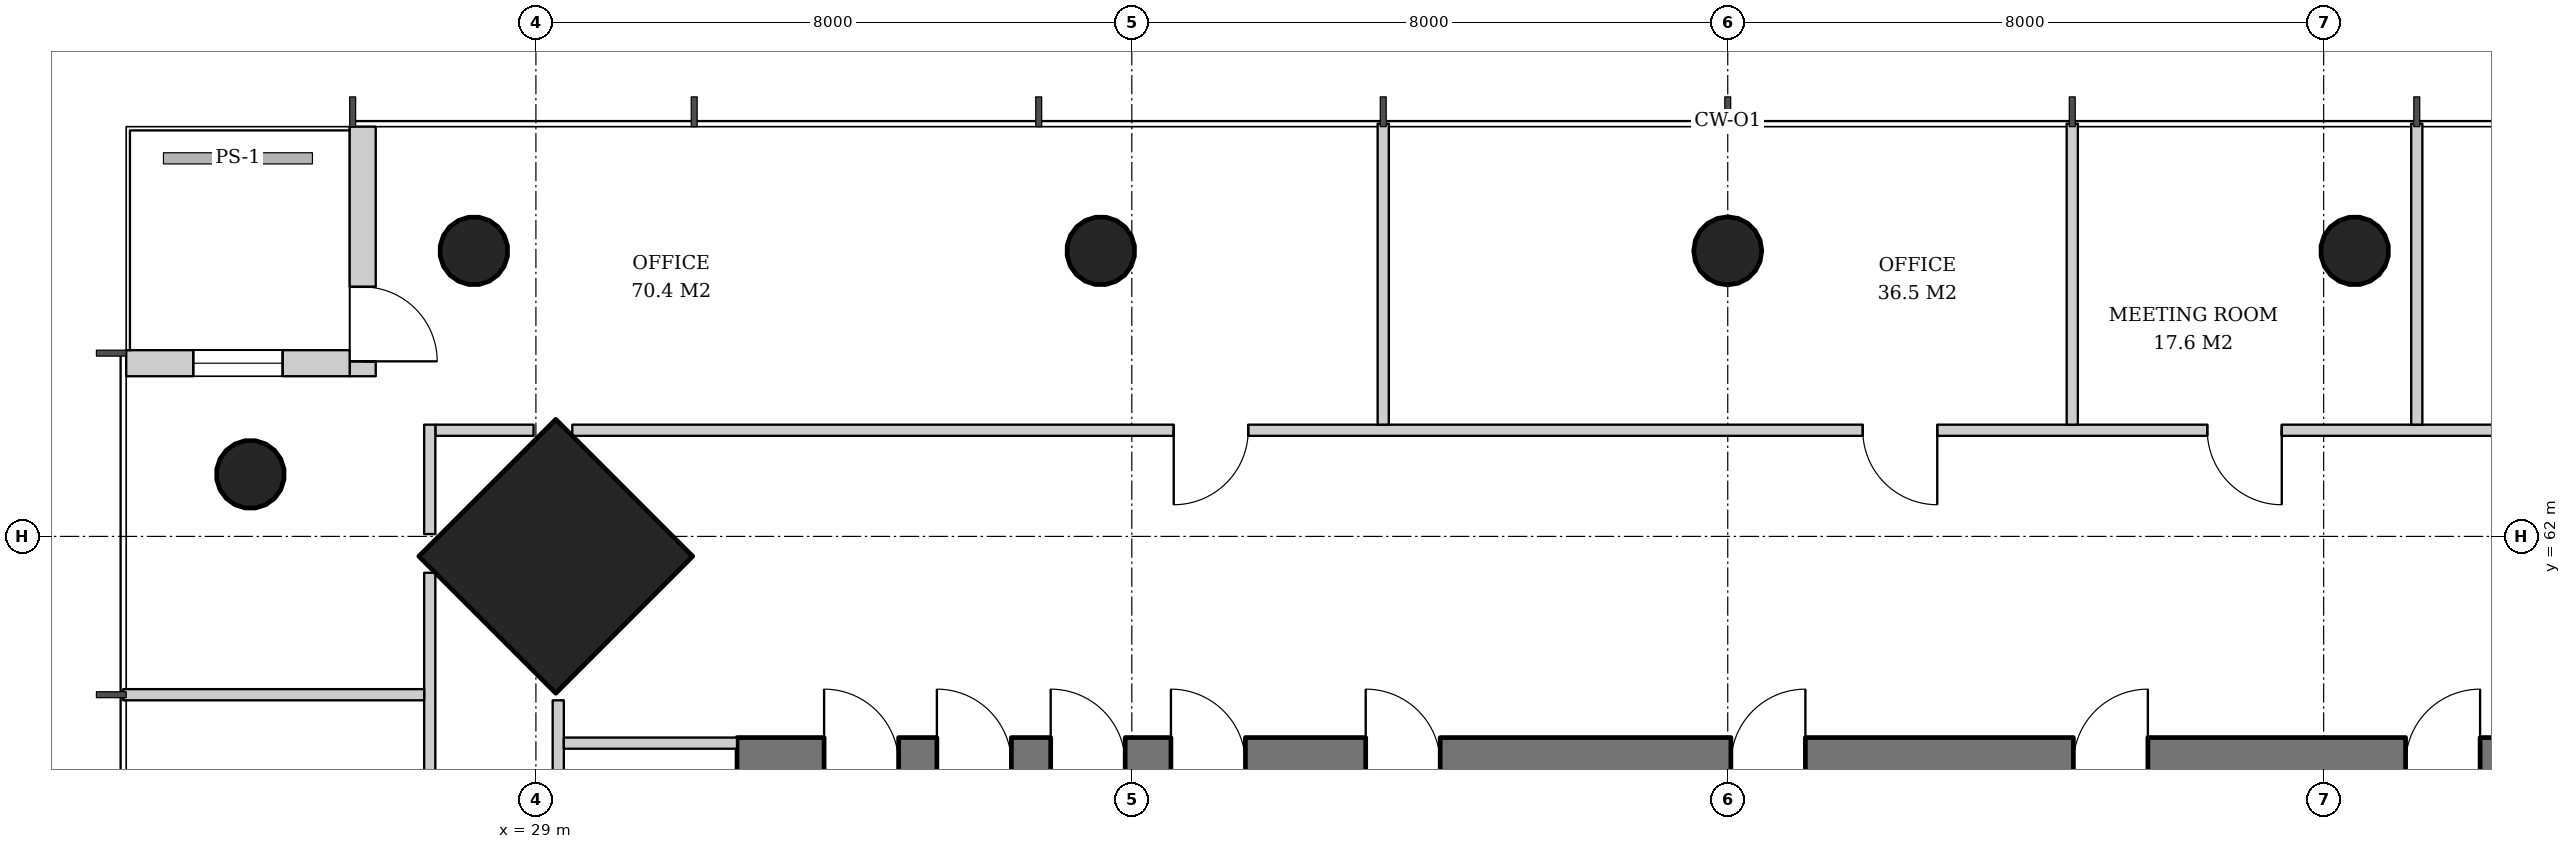
"""IFC4 building model, lengths in metres.
Left out: names, types, materials, properties, quantities, classifications, styles, units other than length and angle.
Written with IfcOpenShell. Run it as: python <this file> out.ifc"""

import sys

from ifc_helpers import new_model, si_unit, direction, frame, frame_2d, origin, origin_2d, place, context, subcontext, project, spatial, rectangle, hollow_circle, extrude, element, fill, save


model = new_model("IFC4")
c1 = context("Model", 3, precision=1e-05, world=origin(), true_north=direction((0.0, 1.0)))
c2 = subcontext(c1, "Body", "Model", "MODEL_VIEW")
j1 = project(units=[si_unit("LENGTHUNIT", "METRE"), si_unit("PLANEANGLEUNIT", "RADIAN")], contexts=[c1])
p1 = place(None, origin())
s1 = spatial("IfcSite", under=j1, at=p1, CompositionType="ELEMENT")
p2 = place(p1, origin())
s2 = spatial("IfcBuilding", under=s1, at=p2, CompositionType="ELEMENT")
p3 = place(p2, frame((0.0, 0.0, 150.2)))
s3 = spatial("IfcBuildingStorey", under=s2, at=p3, CompositionType="ELEMENT", Elevation=150.2)
p4 = place(p3, frame((29.229, 61.771, 0.0), z_axis=(0.031962158256, -0.031962158256, 0.998977898093), x_axis=(0.707106781187, 0.707106781187, 0.0)))
e1 = element("IfcColumn", 1, at=p4, inside=s3, PredefinedType="COLUMN", context=c2, shape_type="SweptSolid", body=[
    extrude(rectangle(XDim=2.6, YDim=2.6, at=origin_2d()), origin(), (0.0, 0.0, 1.0), 3.804),
])
p5 = place(p3, frame((28.129, 65.871, 0.0), z_axis=(0.031898107953, -0.031898107953, 0.998981992539), x_axis=(0.707106781187, 0.707106781187, 0.0)))
e2 = element("IfcColumn", 2, at=p5, inside=s3, PredefinedType="COLUMN", context=c2, shape_type="SweptSolid", body=[
    extrude(hollow_circle(Radius=0.457, WallThickness=0.03, at=origin_2d()), origin(), (0.0, 0.0, 1.0), 3.804),
])
p6 = place(p3, frame((53.436, 65.871, 0.0), z_axis=(-0.015987237665, -0.031910269556, 0.999362868496), x_axis=(0.894067115991, -0.447933021895, 0.0)))
e3 = element("IfcColumn", 3, at=p6, inside=s3, PredefinedType="COLUMN", context=c2, shape_type="SweptSolid", body=[
    extrude(hollow_circle(Radius=0.457, WallThickness=0.03, at=origin_2d()), origin(), (0.0, 0.0, 1.0), 3.802),
])
p7 = place(p3, frame((45.0, 65.871, 0.0), z_axis=(0.0, -0.031914348339, 0.999490607445), x_axis=(1.0, 0.0, 0.0)))
e4 = element("IfcColumn", 4, at=p7, inside=s3, PredefinedType="COLUMN", context=c2, shape_type="SweptSolid", body=[
    extrude(hollow_circle(Radius=0.457, WallThickness=0.03, at=origin_2d()), origin(), (0.0, 0.0, 1.0), 3.802),
])
p8 = place(p3, frame((36.564, 65.871, 0.0), z_axis=(0.015987237665, -0.031910269556, 0.999362868496), x_axis=(0.894067115991, 0.447933021895, 0.0)))
e5 = element("IfcColumn", 5, at=p8, inside=s3, PredefinedType="COLUMN", context=c2, shape_type="SweptSolid", body=[
    extrude(hollow_circle(Radius=0.457, WallThickness=0.03, at=origin_2d()), origin(), (0.0, 0.0, 1.0), 3.802),
])
p9 = place(p3, frame((25.129, 62.871, 0.0), z_axis=(0.031898107953, -0.031898107953, 0.998981992539), x_axis=(0.707106781187, 0.707106781187, 0.0)))
e6 = element("IfcColumn", 6, at=p9, inside=s3, PredefinedType="COLUMN", context=c2, shape_type="SweptSolid", body=[
    extrude(hollow_circle(Radius=0.457, WallThickness=0.03, at=origin_2d()), origin(), (0.0, 0.0, 1.0), 3.804),
])
p10 = place(p3, frame((31.7, 58.95, 0.0), z_axis=(0.0, 0.0, 1.0), x_axis=(1.0, 0.0, 0.0)))
e7 = element("IfcWall", 7, at=p10, inside=s3, PredefinedType="SHEAR", context=c2, shape_type="SweptSolid", body=[
    extrude(rectangle(XDim=26.6, YDim=0.7, at=frame_2d((13.3, 0.0))), origin(), (0.0, 0.0, 1.0), 3.8),
])
p11 = place(p10, frame((17.94, 0.0, 0.0)))
e8 = element("IfcOpeningElement", 8, at=p11, cuts=e7, PredefinedType="OPENING", context=c2, shape_type="SweptSolid", body=[
    extrude(rectangle(XDim=1.0, YDim=2.1, at=frame_2d((0.5, 1.05))), frame((0.0, 0.36, 0.0), z_axis=(0.0, -1.0, 0.0), x_axis=(1.0, 0.0, 0.0)), (0.0, 0.0, 1.0), 0.72),
])
p12 = place(p10, frame((5.825, 0.0, 0.0)))
e9 = element("IfcOpeningElement", 9, at=p12, cuts=e7, PredefinedType="OPENING", context=c2, shape_type="SweptSolid", body=[
    extrude(rectangle(XDim=1.0, YDim=2.1, at=frame_2d((0.5, 1.05))), frame((0.0, 0.36, 0.0), z_axis=(0.0, -1.0, 0.0), x_axis=(1.0, 0.0, 0.0)), (0.0, 0.0, 1.0), 0.72),
])
p13 = place(p10, frame((1.169, 0.0, 0.0)))
e10 = element("IfcOpeningElement", 10, at=p13, cuts=e7, PredefinedType="OPENING", context=c2, shape_type="SweptSolid", body=[
    extrude(rectangle(XDim=1.0, YDim=2.1, at=frame_2d((0.5, 1.05))), frame((0.0, 0.36, 0.0), z_axis=(0.0, -1.0, 0.0), x_axis=(1.0, 0.0, 0.0)), (0.0, 0.0, 1.0), 0.72),
])
p14 = place(p10, frame((2.683, 0.0, 0.0)))
e11 = element("IfcOpeningElement", 11, at=p14, cuts=e7, PredefinedType="OPENING", context=c2, shape_type="SweptSolid", body=[
    extrude(rectangle(XDim=1.0, YDim=2.1, at=frame_2d((0.5, 1.05))), frame((0.0, 0.36, 0.0), z_axis=(0.0, -1.0, 0.0), x_axis=(1.0, 0.0, 0.0)), (0.0, 0.0, 1.0), 0.72),
])
p15 = place(p10, frame((4.211, 0.0, 0.0)))
e12 = element("IfcOpeningElement", 12, at=p15, cuts=e7, PredefinedType="OPENING", context=c2, shape_type="SweptSolid", body=[
    extrude(rectangle(XDim=1.0, YDim=2.1, at=frame_2d((0.5, 1.05))), frame((0.0, 0.36, 0.0), z_axis=(0.0, -1.0, 0.0), x_axis=(1.0, 0.0, 0.0)), (0.0, 0.0, 1.0), 0.72),
])
p16 = place(p10, frame((8.44, 0.0, 0.0)))
e13 = element("IfcOpeningElement", 13, at=p16, cuts=e7, PredefinedType="OPENING", context=c2, shape_type="SweptSolid", body=[
    extrude(rectangle(XDim=1.0, YDim=2.1, at=frame_2d((0.5, 1.05))), frame((0.0, 0.36, 0.0), z_axis=(0.0, -1.0, 0.0), x_axis=(1.0, 0.0, 0.0)), (0.0, 0.0, 1.0), 0.72),
])
p17 = place(p10, frame((13.342, 0.0, 0.0)))
e14 = element("IfcOpeningElement", 14, at=p17, cuts=e7, PredefinedType="OPENING", context=c2, shape_type="SweptSolid", body=[
    extrude(rectangle(XDim=1.0, YDim=2.1, at=frame_2d((0.5, 1.05))), frame((0.0, 0.36, 0.0), z_axis=(0.0, -1.0, 0.0), x_axis=(1.0, 0.0, 0.0)), (0.0, 0.0, 1.0), 0.72),
])
p18 = place(p10, frame((22.4, 0.0, 0.0)))
e15 = element("IfcOpeningElement", 15, at=p18, cuts=e7, PredefinedType="OPENING", context=c2, shape_type="SweptSolid", body=[
    extrude(rectangle(XDim=1.0, YDim=2.1, at=frame_2d((0.5, 1.05))), frame((0.0, 0.36, 0.0), z_axis=(0.0, -1.0, 0.0), x_axis=(1.0, 0.0, 0.0)), (0.0, 0.0, 1.0), 0.72),
])
p19 = place(p3, frame((26.675, 67.5, 0.0), z_axis=(0.0, 0.0, 1.0), x_axis=(0.0, -1.0, 0.0)))
e16 = element("IfcWall", 16, at=p19, inside=s3, PredefinedType="SOLIDWALL", context=c2, shape_type="SweptSolid", body=[
    extrude(rectangle(XDim=3.35, YDim=0.35, at=frame_2d((1.675, 0.0))), origin(), (0.0, 0.0, 1.0), 3.62),
])
p20 = place(p19, frame((2.15, 0.0, 0.0)))
e17 = element("IfcOpeningElement", 17, at=p20, cuts=e16, PredefinedType="OPENING", context=c2, shape_type="SweptSolid", body=[
    extrude(rectangle(XDim=1.0, YDim=2.4, at=frame_2d((0.5, 1.2))), frame((0.0, 0.185, 0.0), z_axis=(0.0, -1.0, 0.0), x_axis=(1.0, 0.0, 0.0)), (0.0, 0.0, 1.0), 0.37),
])
p21 = place(p3, frame((26.5, 64.325, 0.0), z_axis=(0.0, 0.0, 1.0), x_axis=(-1.0, 0.0, 0.0)))
e18 = element("IfcWall", 18, at=p21, inside=s3, PredefinedType="SOLIDWALL", context=c2, shape_type="SweptSolid", body=[
    extrude(rectangle(XDim=3.0, YDim=0.35, at=frame_2d((1.5, 0.0))), origin(), (0.0, 0.0, 1.0), 3.62),
])
p22 = place(p21, frame((0.9, 0.0, 0.6)))
e19 = element("IfcOpeningElement", 19, at=p22, cuts=e18, PredefinedType="OPENING", context=c2, shape_type="SweptSolid", body=[
    extrude(rectangle(XDim=1.2, YDim=2.55, at=frame_2d((0.6, 1.275))), frame((0.0, 0.185, 0.0), z_axis=(0.0, -1.0, 0.0), x_axis=(1.0, 0.0, 0.0)), (0.0, 0.0, 1.0), 0.37),
])
p23 = place(p3, frame((29.3, 59.8, 0.0), z_axis=(0.0, 0.0, 1.0), x_axis=(0.0, -1.0, 0.0)))
e20 = element("IfcWall", 20, at=p23, inside=s3, PredefinedType="PARTITIONING", context=c2, shape_type="SweptSolid", body=[
    extrude(rectangle(XDim=6.425, YDim=0.15, at=frame_2d((3.212, 0.0))), origin(), (0.0, 0.0, 1.0), 2.72),
])
p24 = place(p23, frame((2.962, 0.0, 0.0)))
e21 = element("IfcOpeningElement", 21, at=p24, cuts=e20, PredefinedType="OPENING", context=c2, shape_type="SweptSolid", body=[
    extrude(rectangle(XDim=1.0, YDim=2.1, at=frame_2d((0.5, 1.05))), frame((0.0, 0.085, 0.0), z_axis=(0.0, -1.0, 0.0), x_axis=(1.0, 0.0, 0.0)), (0.0, 0.0, 1.0), 0.17),
])
p25 = place(p3, frame((31.7, 59.225, 0.0), z_axis=(0.0, 0.0, 1.0), x_axis=(-1.0, 0.0, 0.0)))
e22 = element("IfcWall", 22, at=p25, inside=s3, PredefinedType="PARTITIONING", context=c2, shape_type="SweptSolid", body=[
    extrude(rectangle(XDim=2.325, YDim=0.15, at=frame_2d((1.163, 0.0))), origin(), (0.0, 0.0, 1.0), 3.62),
])
p26 = place(p3, frame((60.511, 63.425, 0.0), z_axis=(0.0, 0.0, 1.0), x_axis=(-1.0, 0.0, 0.0)))
e23 = element("IfcWall", 23, at=p26, inside=s3, PredefinedType="PARTITIONING", context=c2, shape_type="SweptSolid", body=[
    extrude(rectangle(XDim=31.023, YDim=0.15, at=frame_2d((15.511, 0.0))), origin(), (0.0, 0.0, 1.0), 2.72),
])
p27 = place(p26, frame((3.449, 0.0, 0.0)))
e24 = element("IfcOpeningElement", 24, at=p27, cuts=e23, PredefinedType="OPENING", context=c2, shape_type="SweptSolid", body=[
    extrude(rectangle(XDim=1.0, YDim=2.1, at=frame_2d((0.5, 1.05))), frame((0.0, 0.085, 0.0), z_axis=(0.0, -1.0, 0.0), x_axis=(1.0, 0.0, 0.0)), (0.0, 0.0, 1.0), 0.17),
])
p28 = place(p26, frame((8.074, 0.0, 0.0)))
e25 = element("IfcOpeningElement", 25, at=p28, cuts=e23, PredefinedType="OPENING", context=c2, shape_type="SweptSolid", body=[
    extrude(rectangle(XDim=1.0, YDim=2.1, at=frame_2d((0.5, 1.05))), frame((0.0, 0.085, 0.0), z_axis=(0.0, -1.0, 0.0), x_axis=(1.0, 0.0, 0.0)), (0.0, 0.0, 1.0), 0.17),
])
p29 = place(p26, frame((12.699, 0.0, 0.0)))
e26 = element("IfcOpeningElement", 26, at=p29, cuts=e23, PredefinedType="OPENING", context=c2, shape_type="SweptSolid", body=[
    extrude(rectangle(XDim=1.0, YDim=2.1, at=frame_2d((0.5, 1.05))), frame((0.0, 0.085, 0.0), z_axis=(0.0, -1.0, 0.0), x_axis=(1.0, 0.0, 0.0)), (0.0, 0.0, 1.0), 0.17),
])
p30 = place(p26, frame((21.949, 0.0, 0.0)))
e27 = element("IfcOpeningElement", 27, at=p30, cuts=e23, PredefinedType="OPENING", context=c2, shape_type="SweptSolid", body=[
    extrude(rectangle(XDim=1.0, YDim=2.1, at=frame_2d((0.5, 1.05))), frame((0.0, 0.085, 0.0), z_axis=(0.0, -1.0, 0.0), x_axis=(1.0, 0.0, 0.0)), (0.0, 0.0, 1.0), 0.17),
])
p31 = place(p3, frame((28.969, 63.425, 0.0), z_axis=(0.0, 0.0, 1.0), x_axis=(-1.0, 0.0, 0.0)))
e28 = element("IfcWall", 28, at=p31, inside=s3, PredefinedType="PARTITIONING", context=c2, shape_type="SweptSolid", body=[
    extrude(rectangle(XDim=1.319, YDim=0.15, at=frame_2d((0.659, 0.0))), origin(), (0.0, 0.0, 1.0), 3.07),
])
for number, where, z_axis, x_axis in (
    (29, (54.25, 63.5, 0.0), (0.0, 0.0, 1.0), (0.0, 1.0, 0.0)),
    (30, (49.625, 63.5, 0.0), (0.0, 0.0, 1.0), (0.0, 1.0, 0.0)),
    (31, (40.375, 63.5, 0.0), (0.0, 0.0, 1.0), (0.0, 1.0, 0.0)),
):
    element("IfcWall", number, at=place(p3, frame(where, z_axis=z_axis, x_axis=x_axis)), inside=s3, PredefinedType="PARTITIONING", context=c2, shape_type="SweptSolid", body=[
        extrude(rectangle(XDim=4.04, YDim=0.15, at=frame_2d((2.02, 0.0))), origin(), (0.0, 0.0, 1.0), 2.82),
    ])
p32 = place(p3, frame((27.575, 63.5, 0.0), z_axis=(0.0, 0.0, 1.0), x_axis=(0.0, -1.0, 0.0)))
e32 = element("IfcWall", 32, at=p32, inside=s3, PredefinedType="PARTITIONING", context=c2, shape_type="SweptSolid", body=[
    extrude(rectangle(XDim=1.469, YDim=0.15, at=frame_2d((0.734, 0.0))), origin(), (0.0, 0.0, 1.0), 3.07),
])
p33 = place(p3, frame((27.575, 61.511, 0.0), z_axis=(0.0, 0.0, 1.0), x_axis=(0.0, -1.0, 0.0)))
e33 = element("IfcWall", 33, at=p33, inside=s3, PredefinedType="PARTITIONING", context=c2, shape_type="SweptSolid", body=[
    extrude(rectangle(XDim=31.023, YDim=0.15, at=frame_2d((15.511, 0.0))), origin(), (0.0, 0.0, 1.0), 2.72),
])
p34 = place(p33, frame((3.449, 0.0, 0.0)))
e34 = element("IfcOpeningElement", 34, at=p34, cuts=e33, PredefinedType="OPENING", context=c2, shape_type="SweptSolid", body=[
    extrude(rectangle(XDim=1.0, YDim=2.1, at=frame_2d((0.5, 1.05))), frame((0.0, 0.085, 0.0), z_axis=(0.0, -1.0, 0.0), x_axis=(1.0, 0.0, 0.0)), (0.0, 0.0, 1.0), 0.17),
])
p35 = place(p33, frame((8.074, 0.0, 0.0)))
e35 = element("IfcOpeningElement", 35, at=p35, cuts=e33, PredefinedType="OPENING", context=c2, shape_type="SweptSolid", body=[
    extrude(rectangle(XDim=1.0, YDim=2.1, at=frame_2d((0.5, 1.05))), frame((0.0, 0.085, 0.0), z_axis=(0.0, -1.0, 0.0), x_axis=(1.0, 0.0, 0.0)), (0.0, 0.0, 1.0), 0.17),
])
p36 = place(p33, frame((12.699, 0.0, 0.0)))
e36 = element("IfcOpeningElement", 36, at=p36, cuts=e33, PredefinedType="OPENING", context=c2, shape_type="SweptSolid", body=[
    extrude(rectangle(XDim=1.0, YDim=2.1, at=frame_2d((0.5, 1.05))), frame((0.0, 0.085, 0.0), z_axis=(0.0, -1.0, 0.0), x_axis=(1.0, 0.0, 0.0)), (0.0, 0.0, 1.0), 0.17),
])
p37 = place(p33, frame((17.424, 0.0, 0.0)))
e37 = element("IfcOpeningElement", 37, at=p37, cuts=e33, PredefinedType="OPENING", context=c2, shape_type="SweptSolid", body=[
    extrude(rectangle(XDim=0.8, YDim=2.1, at=frame_2d((0.4, 1.05))), frame((0.0, 0.085, 0.0), z_axis=(0.0, -1.0, 0.0), x_axis=(1.0, 0.0, 0.0)), (0.0, 0.0, 1.0), 0.17),
])
p38 = place(p33, frame((21.949, 0.0, 0.0)))
e38 = element("IfcOpeningElement", 38, at=p38, cuts=e33, PredefinedType="OPENING", context=c2, shape_type="SweptSolid", body=[
    extrude(rectangle(XDim=1.0, YDim=2.1, at=frame_2d((0.5, 1.05))), frame((0.0, 0.085, 0.0), z_axis=(0.0, -1.0, 0.0), x_axis=(1.0, 0.0, 0.0)), (0.0, 0.0, 1.0), 0.17),
])
p39 = place(p33, frame((26.674, 0.0, 0.0)))
e39 = element("IfcOpeningElement", 39, at=p39, cuts=e33, PredefinedType="OPENING", context=c2, shape_type="SweptSolid", body=[
    extrude(rectangle(XDim=0.8, YDim=2.1, at=frame_2d((0.4, 1.05))), frame((0.0, 0.085, 0.0), z_axis=(0.0, -1.0, 0.0), x_axis=(1.0, 0.0, 0.0)), (0.0, 0.0, 1.0), 0.17),
])
p40 = place(p3, frame((27.5, 59.875, 0.0), z_axis=(0.0, 0.0, 1.0), x_axis=(-1.0, 0.0, 0.0)))
e40 = element("IfcWall", 40, at=p40, inside=s3, PredefinedType="PARTITIONING", context=c2, shape_type="SweptSolid", body=[
    extrude(rectangle(XDim=4.04, YDim=0.15, at=frame_2d((2.02, 0.0))), origin(), (0.0, 0.0, 1.0), 2.82),
])
p41 = place(p20, origin())
e41 = element("IfcDoor", 41, at=p41, inside=s3, OperationType="SINGLE_SWING_RIGHT", PredefinedType="DOOR", context=c2, shape_type="SweptSolid", body=[
    extrude(rectangle(XDim=1.0, YDim=2.4, at=frame_2d((0.5, 1.2))), frame((0.0, 0.025, 0.0), z_axis=(0.0, -1.0, 0.0), x_axis=(1.0, 0.0, 0.0)), (0.0, 0.0, 1.0), 0.05),
])
fill(e17, e41)
p42 = place(p22, origin())
e42 = element("IfcWindow", 42, at=p42, inside=s3, PartitioningType="SINGLE_PANEL", PredefinedType="WINDOW", context=c2, shape_type="SweptSolid", body=[
    extrude(rectangle(XDim=1.2, YDim=2.55, at=frame_2d((0.6, 1.275))), frame((0.0, 0.03, 0.0), z_axis=(0.0, -1.0, 0.0), x_axis=(1.0, 0.0, 0.0)), (0.0, 0.0, 1.0), 0.06),
])
fill(e19, e42)
p43 = place(p11, origin())
e43 = element("IfcDoor", 43, at=p43, inside=s3, OperationType="SINGLE_SWING_RIGHT", PredefinedType="DOOR", context=c2, shape_type="SweptSolid", body=[
    extrude(rectangle(XDim=1.0, YDim=2.1, at=frame_2d((0.5, 1.05))), frame((0.0, 0.025, 0.0), z_axis=(0.0, -1.0, 0.0), x_axis=(1.0, 0.0, 0.0)), (0.0, 0.0, 1.0), 0.05),
])
fill(e8, e43)
p44 = place(p12, origin())
e44 = element("IfcDoor", 44, at=p44, inside=s3, OperationType="SINGLE_SWING_LEFT", PredefinedType="DOOR", context=c2, shape_type="SweptSolid", body=[
    extrude(rectangle(XDim=1.0, YDim=2.1, at=frame_2d((0.5, 1.05))), frame((0.0, 0.025, 0.0), z_axis=(0.0, -1.0, 0.0), x_axis=(1.0, 0.0, 0.0)), (0.0, 0.0, 1.0), 0.05),
])
fill(e9, e44)
p45 = place(p28, origin())
e45 = element("IfcDoor", 45, at=p45, inside=s3, OperationType="SINGLE_SWING_LEFT", PredefinedType="DOOR", context=c2, shape_type="SweptSolid", body=[
    extrude(rectangle(XDim=1.0, YDim=2.1, at=frame_2d((0.5, 1.05))), frame((0.0, 0.025, 0.0), z_axis=(0.0, -1.0, 0.0), x_axis=(1.0, 0.0, 0.0)), (0.0, 0.0, 1.0), 0.05),
])
fill(e25, e45)
p46 = place(p29, origin())
e46 = element("IfcDoor", 46, at=p46, inside=s3, OperationType="SINGLE_SWING_LEFT", PredefinedType="DOOR", context=c2, shape_type="SweptSolid", body=[
    extrude(rectangle(XDim=1.0, YDim=2.1, at=frame_2d((0.5, 1.05))), frame((0.0, 0.025, 0.0), z_axis=(0.0, -1.0, 0.0), x_axis=(1.0, 0.0, 0.0)), (0.0, 0.0, 1.0), 0.05),
])
fill(e26, e46)
p47 = place(p30, origin())
e47 = element("IfcDoor", 47, at=p47, inside=s3, OperationType="SINGLE_SWING_RIGHT", PredefinedType="DOOR", context=c2, shape_type="SweptSolid", body=[
    extrude(rectangle(XDim=1.0, YDim=2.1, at=frame_2d((0.5, 1.05))), frame((0.0, 0.025, 0.0), z_axis=(0.0, -1.0, 0.0), x_axis=(1.0, 0.0, 0.0)), (0.0, 0.0, 1.0), 0.05),
])
fill(e27, e47)
save(model, sys.argv[1])
